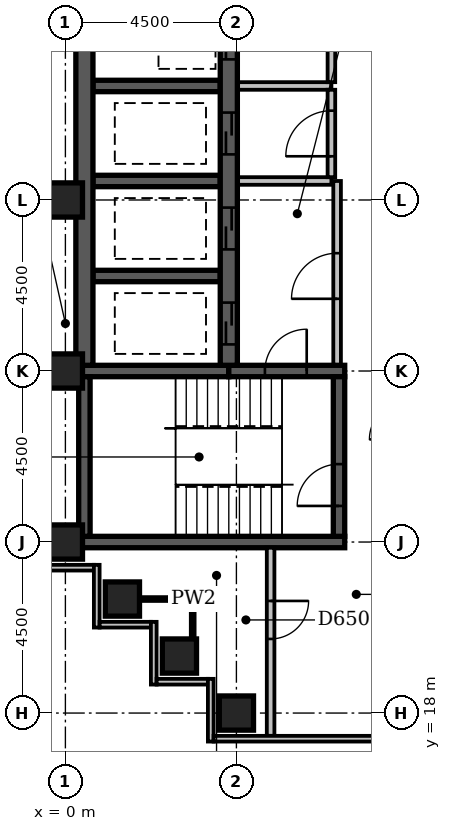
"""IFC4 building model, lengths in metres.
Left out: names, types, materials, properties, quantities, classifications, styles, units other than length and angle.
Written with IfcOpenShell. Run it as: python <this file> out.ifc"""

import sys

from ifc_helpers import new_model, si_unit, direction, frame, frame_2d, origin, origin_2d, place, context, subcontext, project, spatial, rectangle, extrude, element, fill, save


model = new_model("IFC4")
c1 = context("Model", 3, precision=1e-05, world=origin(), true_north=direction((0.0, 1.0)))
c2 = subcontext(c1, "Body", "Model", "MODEL_VIEW")
j1 = project(units=[si_unit("LENGTHUNIT", "METRE"), si_unit("PLANEANGLEUNIT", "RADIAN")], contexts=[c1])
p1 = place(None, origin())
s1 = spatial("IfcSite", under=j1, at=p1, CompositionType="ELEMENT")
p2 = place(p1, origin())
s2 = spatial("IfcBuilding", under=s1, at=p2, CompositionType="ELEMENT")
p3 = place(p2, frame((0.0, 0.0, 251.0)))
s3 = spatial("IfcBuildingStorey", under=s2, at=p3, CompositionType="ELEMENT", Elevation=251.0)
p4 = place(p3, frame((0.35, 22.5, -0.3), z_axis=(0.0, 0.0, 1.0), x_axis=(1.0, 0.0, 0.0)))
e1 = element("IfcWall", 1, at=p4, inside=s3, PredefinedType="SHEAR", context=c2, shape_type="SweptSolid", body=[
    extrude(rectangle(XDim=7.0, YDim=0.3, at=frame_2d((3.5, 0.0))), origin(), (0.0, 0.0, 1.0), 3.6),
])
p5 = place(p3, frame((0.35, 27.0, -0.3), z_axis=(0.0, 0.0, 1.0), x_axis=(1.0, 0.0, 0.0)))
e2 = element("IfcWall", 2, at=p5, inside=s3, PredefinedType="SHEAR", context=c2, shape_type="SweptSolid", body=[
    extrude(rectangle(XDim=3.95, YDim=0.3, at=frame_2d((1.975, 0.0))), origin(), (0.0, 0.0, 1.0), 3.6),
])
p6 = place(p3, frame((0.5, 22.65, -0.3), z_axis=(0.0, 0.0, 1.0), x_axis=(0.0, 1.0, 0.0)))
e3 = element("IfcWall", 3, at=p6, inside=s3, PredefinedType="SHEAR", context=c2, shape_type="SweptSolid", body=[
    extrude(rectangle(XDim=4.2, YDim=0.3, at=frame_2d((2.1, 0.0))), origin(), (0.0, 0.0, 1.0), 3.6),
])
p7 = place(p3, frame((0.5, 27.15, -0.3), z_axis=(0.0, 0.0, 1.0), x_axis=(0.0, 1.0, 0.0)))
e4 = element("IfcWall", 4, at=p7, inside=s3, PredefinedType="SHEAR", context=c2, shape_type="SweptSolid", body=[
    extrude(rectangle(XDim=22.125, YDim=0.45, at=frame_2d((11.062, 0.0))), origin(), (0.0, 0.0, 1.0), 3.6),
])
for number, where, z_axis, x_axis in (
    (5, (0.725, 29.5, -0.3), (0.0, 0.0, 1.0), (1.0, 0.0, 0.0)),
    (6, (0.725, 32.0, -0.3), (0.0, 0.0, 1.0), (1.0, 0.0, 0.0)),
    (7, (0.725, 34.5, -0.3), (0.0, 0.0, 1.0), (1.0, 0.0, 0.0)),
):
    element("IfcWall", number, at=place(p3, frame(where, z_axis=z_axis, x_axis=x_axis)), inside=s3, PredefinedType="SHEAR", context=c2, shape_type="SweptSolid", body=[
        extrude(rectangle(XDim=3.35, YDim=0.3, at=frame_2d((1.675, 0.0))), origin(), (0.0, 0.0, 1.0), 3.6),
    ])
p8 = place(p3, frame((4.3, 27.0, -0.3), z_axis=(0.0, 0.0, 1.0), x_axis=(1.0, 0.0, 0.0)))
e8 = element("IfcWall", 8, at=p8, inside=s3, PredefinedType="SHEAR", context=c2, shape_type="SweptSolid", body=[
    extrude(rectangle(XDim=3.05, YDim=0.3, at=frame_2d((1.525, 0.0))), origin(), (0.0, 0.0, 1.0), 3.6),
])
p9 = place(p8, frame((0.95, 0.0, 0.3)))
e9 = element("IfcOpeningElement", 9, at=p9, cuts=e8, PredefinedType="OPENING", context=c2, shape_type="SweptSolid", body=[
    extrude(rectangle(XDim=1.1, YDim=2.1, at=frame_2d((0.55, 1.05))), frame((0.0, 0.162, 0.0), z_axis=(0.0, -1.0, 0.0), x_axis=(1.0, 0.0, 0.0)), (0.0, 0.0, 1.0), 0.324),
])
p10 = place(p3, frame((4.3, 27.15, -0.3), z_axis=(0.0, 0.0, 1.0), x_axis=(0.0, 1.0, 0.0)))
e10 = element("IfcWall", 10, at=p10, inside=s3, PredefinedType="SHEAR", context=c2, shape_type="SweptSolid", body=[
    extrude(rectangle(XDim=22.125, YDim=0.45, at=frame_2d((11.062, 0.0))), origin(), (0.0, 0.0, 1.0), 3.6),
])
p11 = place(p10, frame((3.05, 0.0, 0.3)))
e11 = element("IfcOpeningElement", 11, at=p11, cuts=e10, PredefinedType="OPENING", context=c2, shape_type="SweptSolid", body=[
    extrude(rectangle(XDim=1.1, YDim=2.1, at=frame_2d((0.55, 1.05))), frame((0.0, 0.237, 0.0), z_axis=(0.0, -1.0, 0.0), x_axis=(1.0, 0.0, 0.0)), (0.0, 0.0, 1.0), 0.474),
])
p12 = place(p10, frame((0.55, 0.0, 0.3)))
e12 = element("IfcOpeningElement", 12, at=p12, cuts=e10, PredefinedType="OPENING", context=c2, shape_type="SweptSolid", body=[
    extrude(rectangle(XDim=1.1, YDim=2.1, at=frame_2d((0.55, 1.05))), frame((0.0, 0.237, 0.0), z_axis=(0.0, -1.0, 0.0), x_axis=(1.0, 0.0, 0.0)), (0.0, 0.0, 1.0), 0.474),
])
p13 = place(p10, frame((20.55, 0.0, 0.3)))
e13 = element("IfcOpeningElement", 13, at=p13, cuts=e10, PredefinedType="OPENING", context=c2, shape_type="SweptSolid", body=[
    extrude(rectangle(XDim=1.1, YDim=2.1, at=frame_2d((0.55, 1.05))), frame((0.0, 0.237, 0.0), z_axis=(0.0, -1.0, 0.0), x_axis=(1.0, 0.0, 0.0)), (0.0, 0.0, 1.0), 0.474),
])
p14 = place(p10, frame((18.05, 0.0, 0.3)))
e14 = element("IfcOpeningElement", 14, at=p14, cuts=e10, PredefinedType="OPENING", context=c2, shape_type="SweptSolid", body=[
    extrude(rectangle(XDim=1.1, YDim=2.1, at=frame_2d((0.55, 1.05))), frame((0.0, 0.237, 0.0), z_axis=(0.0, -1.0, 0.0), x_axis=(1.0, 0.0, 0.0)), (0.0, 0.0, 1.0), 0.474),
])
p15 = place(p10, frame((15.55, 0.0, 0.3)))
e15 = element("IfcOpeningElement", 15, at=p15, cuts=e10, PredefinedType="OPENING", context=c2, shape_type="SweptSolid", body=[
    extrude(rectangle(XDim=1.1, YDim=2.1, at=frame_2d((0.55, 1.05))), frame((0.0, 0.237, 0.0), z_axis=(0.0, -1.0, 0.0), x_axis=(1.0, 0.0, 0.0)), (0.0, 0.0, 1.0), 0.474),
])
p16 = place(p10, frame((13.05, 0.0, 0.3)))
e16 = element("IfcOpeningElement", 16, at=p16, cuts=e10, PredefinedType="OPENING", context=c2, shape_type="SweptSolid", body=[
    extrude(rectangle(XDim=1.1, YDim=2.1, at=frame_2d((0.55, 1.05))), frame((0.0, 0.237, 0.0), z_axis=(0.0, -1.0, 0.0), x_axis=(1.0, 0.0, 0.0)), (0.0, 0.0, 1.0), 0.474),
])
p17 = place(p10, frame((10.55, 0.0, 0.3)))
e17 = element("IfcOpeningElement", 17, at=p17, cuts=e10, PredefinedType="OPENING", context=c2, shape_type="SweptSolid", body=[
    extrude(rectangle(XDim=1.1, YDim=2.1, at=frame_2d((0.55, 1.05))), frame((0.0, 0.237, 0.0), z_axis=(0.0, -1.0, 0.0), x_axis=(1.0, 0.0, 0.0)), (0.0, 0.0, 1.0), 0.474),
])
p18 = place(p10, frame((8.05, 0.0, 0.3)))
e18 = element("IfcOpeningElement", 18, at=p18, cuts=e10, PredefinedType="OPENING", context=c2, shape_type="SweptSolid", body=[
    extrude(rectangle(XDim=1.1, YDim=2.1, at=frame_2d((0.55, 1.05))), frame((0.0, 0.237, 0.0), z_axis=(0.0, -1.0, 0.0), x_axis=(1.0, 0.0, 0.0)), (0.0, 0.0, 1.0), 0.474),
])
p19 = place(p10, frame((5.55, 0.0, 0.3)))
e19 = element("IfcOpeningElement", 19, at=p19, cuts=e10, PredefinedType="OPENING", context=c2, shape_type="SweptSolid", body=[
    extrude(rectangle(XDim=1.1, YDim=2.1, at=frame_2d((0.55, 1.05))), frame((0.0, 0.237, 0.0), z_axis=(0.0, -1.0, 0.0), x_axis=(1.0, 0.0, 0.0)), (0.0, 0.0, 1.0), 0.474),
])
p20 = place(p3, frame((7.2, 22.65, -0.3), z_axis=(0.0, 0.0, 1.0), x_axis=(0.0, 1.0, 0.0)))
e20 = element("IfcWall", 20, at=p20, inside=s3, PredefinedType="SHEAR", context=c2, shape_type="SweptSolid", body=[
    extrude(rectangle(XDim=4.2, YDim=0.3, at=frame_2d((2.1, 0.0))), origin(), (0.0, 0.0, 1.0), 3.6),
])
p21 = place(p20, frame((0.8, 0.0, 0.3)))
e21 = element("IfcOpeningElement", 21, at=p21, cuts=e20, PredefinedType="OPENING", context=c2, shape_type="SweptSolid", body=[
    extrude(rectangle(XDim=1.1, YDim=2.1, at=frame_2d((0.55, 1.05))), frame((0.0, 0.162, 0.0), z_axis=(0.0, -1.0, 0.0), x_axis=(1.0, 0.0, 0.0)), (0.0, 0.0, 1.0), 0.324),
])
for number, where, z_axis, x_axis in (
    (22, (4.5, 18.0, -0.3), (0.0, 0.0, 1.0), (1.0, 0.0, 0.0)),
    (23, (3.0, 19.5, -0.3), (0.0, 0.0, 1.0), (1.0, 0.0, 0.0)),
    (24, (1.5, 21.0, -0.3), (0.0, 0.0, 1.0), (1.0, 0.0, 0.0)),
    (25, (0.0, 22.5, -0.3), (0.0, 0.0, 1.0), (1.0, 0.0, 0.0)),
    (26, (0.0, 27.0, -0.3), (0.0, 0.0, 1.0), (1.0, 0.0, 0.0)),
    (27, (0.0, 31.5, -0.3), (0.0, 0.0, 1.0), (1.0, 0.0, 0.0)),
):
    element("IfcColumn", number, at=place(p3, frame(where, z_axis=z_axis, x_axis=x_axis)), inside=s3, PredefinedType="COLUMN", context=c2, shape_type="SweptSolid", body=[
        extrude(rectangle(XDim=0.9, YDim=0.9, at=origin_2d()), origin(), (0.0, 0.0, 1.0), 3.6),
    ])
p22 = place(p3, frame((-0.6, 21.825, 0.0), z_axis=(0.0, 0.0, 1.0), x_axis=(1.0, 0.0, 0.0)))
e28 = element("IfcWall", 28, at=p22, inside=s3, PredefinedType="STANDARD", context=c2, shape_type="SweptSolid", body=[
    extrude(rectangle(XDim=1.35, YDim=0.15, at=frame_2d((0.675, 0.0))), origin(), (0.0, 0.0, 1.0), 2.7),
])
p23 = place(p3, frame((0.825, 21.9, 0.0), z_axis=(0.0, 0.0, 1.0), x_axis=(0.0, -1.0, 0.0)))
e29 = element("IfcWall", 29, at=p23, inside=s3, PredefinedType="STANDARD", context=c2, shape_type="SweptSolid", body=[
    extrude(rectangle(XDim=1.65, YDim=0.15, at=frame_2d((0.825, 0.0))), origin(), (0.0, 0.0, 1.0), 2.7),
])
p24 = place(p3, frame((0.9, 20.325, 0.0), z_axis=(0.0, 0.0, 1.0), x_axis=(1.0, 0.0, 0.0)))
e30 = element("IfcWall", 30, at=p24, inside=s3, PredefinedType="STANDARD", context=c2, shape_type="SweptSolid", body=[
    extrude(rectangle(XDim=1.35, YDim=0.15, at=frame_2d((0.675, 0.0))), origin(), (0.0, 0.0, 1.0), 2.7),
])
p25 = place(p3, frame((2.325, 20.4, 0.0), z_axis=(0.0, 0.0, 1.0), x_axis=(0.0, -1.0, 0.0)))
e31 = element("IfcWall", 31, at=p25, inside=s3, PredefinedType="STANDARD", context=c2, shape_type="SweptSolid", body=[
    extrude(rectangle(XDim=1.65, YDim=0.15, at=frame_2d((0.825, 0.0))), origin(), (0.0, 0.0, 1.0), 2.7),
])
p26 = place(p3, frame((2.4, 18.825, 0.0), z_axis=(0.0, 0.0, 1.0), x_axis=(1.0, 0.0, 0.0)))
e32 = element("IfcWall", 32, at=p26, inside=s3, PredefinedType="STANDARD", context=c2, shape_type="SweptSolid", body=[
    extrude(rectangle(XDim=1.35, YDim=0.15, at=frame_2d((0.675, 0.0))), origin(), (0.0, 0.0, 1.0), 2.7),
])
p27 = place(p3, frame((3.825, 18.9, 0.0), z_axis=(0.0, 0.0, 1.0), x_axis=(0.0, -1.0, 0.0)))
e33 = element("IfcWall", 33, at=p27, inside=s3, PredefinedType="STANDARD", context=c2, shape_type="SweptSolid", body=[
    extrude(rectangle(XDim=1.65, YDim=0.15, at=frame_2d((0.825, 0.0))), origin(), (0.0, 0.0, 1.0), 2.7),
])
p28 = place(p3, frame((3.9, 17.325, 0.0), z_axis=(0.0, 0.0, 1.0), x_axis=(1.0, 0.0, 0.0)))
e34 = element("IfcWall", 34, at=p28, inside=s3, PredefinedType="STANDARD", context=c2, shape_type="SweptSolid", body=[
    extrude(rectangle(XDim=19.35, YDim=0.15, at=frame_2d((9.675, 0.0))), origin(), (0.0, 0.0, 1.0), 2.7),
])
p29 = place(p28, frame((6.15, 0.0, 0.6)))
e35 = element("IfcOpeningElement", 35, at=p29, cuts=e34, PredefinedType="OPENING", context=c2, shape_type="SweptSolid", body=[
    extrude(rectangle(XDim=2.4, YDim=1.8, at=frame_2d((1.2, 0.9))), frame((0.0, 0.087, 0.0), z_axis=(0.0, -1.0, 0.0), x_axis=(1.0, 0.0, 0.0)), (0.0, 0.0, 1.0), 0.174),
])
p30 = place(p28, frame((15.15, 0.0, 0.6)))
e36 = element("IfcOpeningElement", 36, at=p30, cuts=e34, PredefinedType="OPENING", context=c2, shape_type="SweptSolid", body=[
    extrude(rectangle(XDim=2.4, YDim=1.8, at=frame_2d((1.2, 0.9))), frame((0.0, 0.087, 0.0), z_axis=(0.0, -1.0, 0.0), x_axis=(1.0, 0.0, 0.0)), (0.0, 0.0, 1.0), 0.174),
])
p31 = place(p3, frame((4.545, 34.5, 0.0), z_axis=(0.0, 0.0, 1.0), x_axis=(1.0, 0.0, 0.0)))
e37 = element("IfcWall", 37, at=p31, inside=s3, PredefinedType="PARTITIONING", context=c2, shape_type="SweptSolid", body=[
    extrude(rectangle(XDim=2.455, YDim=0.2, at=frame_2d((1.228, 0.0))), origin(), (0.0, 0.0, 1.0), 3.3),
])
p32 = place(p3, frame((7.0, 34.6, 0.0), z_axis=(0.0, 0.0, 1.0), x_axis=(0.0, 1.0, 0.0)))
e38 = element("IfcWall", 38, at=p32, inside=s3, PredefinedType="PARTITIONING", context=c2, shape_type="SweptSolid", body=[
    extrude(rectangle(XDim=14.9, YDim=0.2, at=frame_2d((7.45, 0.0))), origin(), (0.0, 0.0, 1.0), 3.3),
])
p33 = place(p32, frame((2.8, 0.0, 0.0)))
e39 = element("IfcOpeningElement", 39, at=p33, cuts=e38, PredefinedType="OPENING", context=c2, shape_type="SweptSolid", body=[
    extrude(rectangle(XDim=1.2, YDim=2.1, at=frame_2d((0.6, 1.05))), frame((0.0, 0.112, 0.0), z_axis=(0.0, -1.0, 0.0), x_axis=(1.0, 0.0, 0.0)), (0.0, 0.0, 1.0), 0.224),
])
p34 = place(p32, frame((9.8, 0.0, 0.0)))
e40 = element("IfcOpeningElement", 40, at=p34, cuts=e38, PredefinedType="OPENING", context=c2, shape_type="SweptSolid", body=[
    extrude(rectangle(XDim=1.2, YDim=2.1, at=frame_2d((0.6, 1.05))), frame((0.0, 0.112, 0.0), z_axis=(0.0, -1.0, 0.0), x_axis=(1.0, 0.0, 0.0)), (0.0, 0.0, 1.0), 0.224),
])
p35 = place(p3, frame((4.545, 32.0, 0.0), z_axis=(0.0, 0.0, 1.0), x_axis=(1.0, 0.0, 0.0)))
e41 = element("IfcWall", 41, at=p35, inside=s3, PredefinedType="PARTITIONING", context=c2, shape_type="SweptSolid", body=[
    extrude(rectangle(XDim=2.455, YDim=0.2, at=frame_2d((1.228, 0.0))), origin(), (0.0, 0.0, 1.0), 3.3),
])
p36 = place(p3, frame((7.0, 32.1, 0.0), z_axis=(0.0, 0.0, 1.0), x_axis=(0.0, 1.0, 0.0)))
e42 = element("IfcWall", 42, at=p36, inside=s3, PredefinedType="PARTITIONING", context=c2, shape_type="SweptSolid", body=[
    extrude(rectangle(XDim=2.3, YDim=0.2, at=frame_2d((1.15, 0.0))), origin(), (0.0, 0.0, 1.0), 3.3),
])
p37 = place(p36, frame((0.55, 0.0, 0.0)))
e43 = element("IfcOpeningElement", 43, at=p37, cuts=e42, PredefinedType="OPENING", context=c2, shape_type="SweptSolid", body=[
    extrude(rectangle(XDim=1.2, YDim=2.1, at=frame_2d((0.6, 1.05))), frame((0.0, 0.112, 0.0), z_axis=(0.0, -1.0, 0.0), x_axis=(1.0, 0.0, 0.0)), (0.0, 0.0, 1.0), 0.224),
])
p38 = place(p3, frame((7.15, 27.17, 0.0), z_axis=(0.0, 0.0, 1.0), x_axis=(0.0, 1.0, 0.0)))
e44 = element("IfcWall", 44, at=p38, inside=s3, PredefinedType="PARTITIONING", context=c2, shape_type="SweptSolid", body=[
    extrude(rectangle(XDim=4.83, YDim=0.2, at=frame_2d((2.415, 0.0))), origin(), (0.0, 0.0, 1.0), 3.3),
])
p39 = place(p38, frame((1.73, 0.0, 0.0)))
e45 = element("IfcOpeningElement", 45, at=p39, cuts=e44, PredefinedType="OPENING", context=c2, shape_type="SweptSolid", body=[
    extrude(rectangle(XDim=1.2, YDim=2.1, at=frame_2d((0.6, 1.05))), frame((0.0, 0.112, 0.0), z_axis=(0.0, -1.0, 0.0), x_axis=(1.0, 0.0, 0.0)), (0.0, 0.0, 1.0), 0.224),
])
p40 = place(p3, frame((5.4, 17.4, 0.0), z_axis=(0.0, 0.0, 1.0), x_axis=(0.0, 1.0, 0.0)))
e46 = element("IfcWall", 46, at=p40, inside=s3, PredefinedType="PARTITIONING", context=c2, shape_type="SweptSolid", body=[
    extrude(rectangle(XDim=4.95, YDim=0.2, at=frame_2d((2.475, 0.0))), origin(), (0.0, 0.0, 1.0), 3.3),
])
p41 = place(p40, frame((2.55, 0.0, 0.0)))
e47 = element("IfcOpeningElement", 47, at=p41, cuts=e46, PredefinedType="OPENING", context=c2, shape_type="SweptSolid", body=[
    extrude(rectangle(XDim=1.0, YDim=2.1, at=frame_2d((0.5, 1.05))), frame((0.0, 0.112, 0.0), z_axis=(0.0, -1.0, 0.0), x_axis=(1.0, 0.0, 0.0)), (0.0, 0.0, 1.0), 0.224),
])
p42 = place(p3, frame((3.35, 19.95, 0.0), z_axis=(0.0, 0.0, 1.0), x_axis=(0.0, 1.0, 0.0)))
e48 = element("IfcWall", 48, at=p42, inside=s3, PredefinedType="PARTITIONING", context=c2, shape_type="SweptSolid", body=[
    extrude(rectangle(XDim=1.05, YDim=0.1, at=frame_2d((0.525, 0.0))), origin(), (0.0, 0.0, 1.0), 3.3),
])
p43 = place(p3, frame((1.95, 21.0, 0.0), z_axis=(0.0, 0.0, 1.0), x_axis=(1.0, 0.0, 0.0)))
e49 = element("IfcWall", 49, at=p43, inside=s3, PredefinedType="PARTITIONING", context=c2, shape_type="SweptSolid", body=[
    extrude(rectangle(XDim=1.65, YDim=0.1, at=frame_2d((0.825, 0.0))), origin(), (0.0, 0.0, 1.0), 3.3),
])
p44 = place(p39, origin())
e50 = element("IfcDoor", 50, at=p44, inside=s3, OperationType="SINGLE_SWING_LEFT", PredefinedType="DOOR", context=c2, shape_type="SweptSolid", body=[
    extrude(rectangle(XDim=1.2, YDim=2.1, at=frame_2d((0.6, 1.05))), frame((0.0, 0.025, 0.0), z_axis=(0.0, -1.0, 0.0), x_axis=(1.0, 0.0, 0.0)), (0.0, 0.0, 1.0), 0.05),
])
fill(e45, e50)
p45 = place(p11, origin())
e51 = element("IfcDoor", 51, at=p45, inside=s3, OperationType="SLIDING_TO_LEFT", PredefinedType="DOOR", context=c2, shape_type="SweptSolid", body=[
    extrude(rectangle(XDim=1.1, YDim=2.1, at=frame_2d((0.55, 1.05))), frame((0.0, 0.025, 0.0), z_axis=(0.0, -1.0, 0.0), x_axis=(1.0, 0.0, 0.0)), (0.0, 0.0, 1.0), 0.05),
])
fill(e11, e51)
p46 = place(p12, origin())
e52 = element("IfcDoor", 52, at=p46, inside=s3, OperationType="SLIDING_TO_LEFT", PredefinedType="DOOR", context=c2, shape_type="SweptSolid", body=[
    extrude(rectangle(XDim=1.1, YDim=2.1, at=frame_2d((0.55, 1.05))), frame((0.0, 0.025, 0.0), z_axis=(0.0, -1.0, 0.0), x_axis=(1.0, 0.0, 0.0)), (0.0, 0.0, 1.0), 0.05),
])
fill(e12, e52)
p47 = place(p18, origin())
e53 = element("IfcDoor", 53, at=p47, inside=s3, OperationType="SLIDING_TO_LEFT", PredefinedType="DOOR", context=c2, shape_type="SweptSolid", body=[
    extrude(rectangle(XDim=1.1, YDim=2.1, at=frame_2d((0.55, 1.05))), frame((0.0, 0.025, 0.0), z_axis=(0.0, -1.0, 0.0), x_axis=(1.0, 0.0, 0.0)), (0.0, 0.0, 1.0), 0.05),
])
fill(e18, e53)
p48 = place(p37, origin())
e54 = element("IfcDoor", 54, at=p48, inside=s3, OperationType="SINGLE_SWING_LEFT", PredefinedType="DOOR", context=c2, shape_type="SweptSolid", body=[
    extrude(rectangle(XDim=1.2, YDim=2.1, at=frame_2d((0.6, 1.05))), frame((0.0, 0.025, 0.0), z_axis=(0.0, -1.0, 0.0), x_axis=(1.0, 0.0, 0.0)), (0.0, 0.0, 1.0), 0.05),
])
fill(e43, e54)
p49 = place(p19, origin())
e55 = element("IfcDoor", 55, at=p49, inside=s3, OperationType="SLIDING_TO_LEFT", PredefinedType="DOOR", context=c2, shape_type="SweptSolid", body=[
    extrude(rectangle(XDim=1.1, YDim=2.1, at=frame_2d((0.55, 1.05))), frame((0.0, 0.025, 0.0), z_axis=(0.0, -1.0, 0.0), x_axis=(1.0, 0.0, 0.0)), (0.0, 0.0, 1.0), 0.05),
])
fill(e19, e55)
p50 = place(p9, frame((1.1, 0.0, 0.0), z_axis=(0.0, 0.0, 1.0), x_axis=(-1.0, 0.0, 0.0)))
e56 = element("IfcDoor", 56, at=p50, inside=s3, OperationType="SINGLE_SWING_LEFT", PredefinedType="DOOR", context=c2, shape_type="SweptSolid", body=[
    extrude(rectangle(XDim=1.1, YDim=2.1, at=frame_2d((0.55, 1.05))), frame((0.0, 0.025, 0.0), z_axis=(0.0, -1.0, 0.0), x_axis=(1.0, 0.0, 0.0)), (0.0, 0.0, 1.0), 0.05),
])
fill(e9, e56)
p51 = place(p21, origin())
e57 = element("IfcDoor", 57, at=p51, inside=s3, OperationType="SINGLE_SWING_LEFT", PredefinedType="DOOR", context=c2, shape_type="SweptSolid", body=[
    extrude(rectangle(XDim=1.1, YDim=2.1, at=frame_2d((0.55, 1.05))), frame((0.0, 0.025, 0.0), z_axis=(0.0, -1.0, 0.0), x_axis=(1.0, 0.0, 0.0)), (0.0, 0.0, 1.0), 0.05),
])
fill(e21, e57)
p52 = place(p41, origin())
e58 = element("IfcDoor", 58, at=p52, inside=s3, OperationType="SINGLE_SWING_RIGHT", PredefinedType="DOOR", context=c2, shape_type="SweptSolid", body=[
    extrude(rectangle(XDim=1.0, YDim=2.1, at=frame_2d((0.5, 1.05))), frame((0.0, 0.025, 0.0), z_axis=(0.0, -1.0, 0.0), x_axis=(1.0, 0.0, 0.0)), (0.0, 0.0, 1.0), 0.05),
])
fill(e47, e58)
save(model, sys.argv[1])
